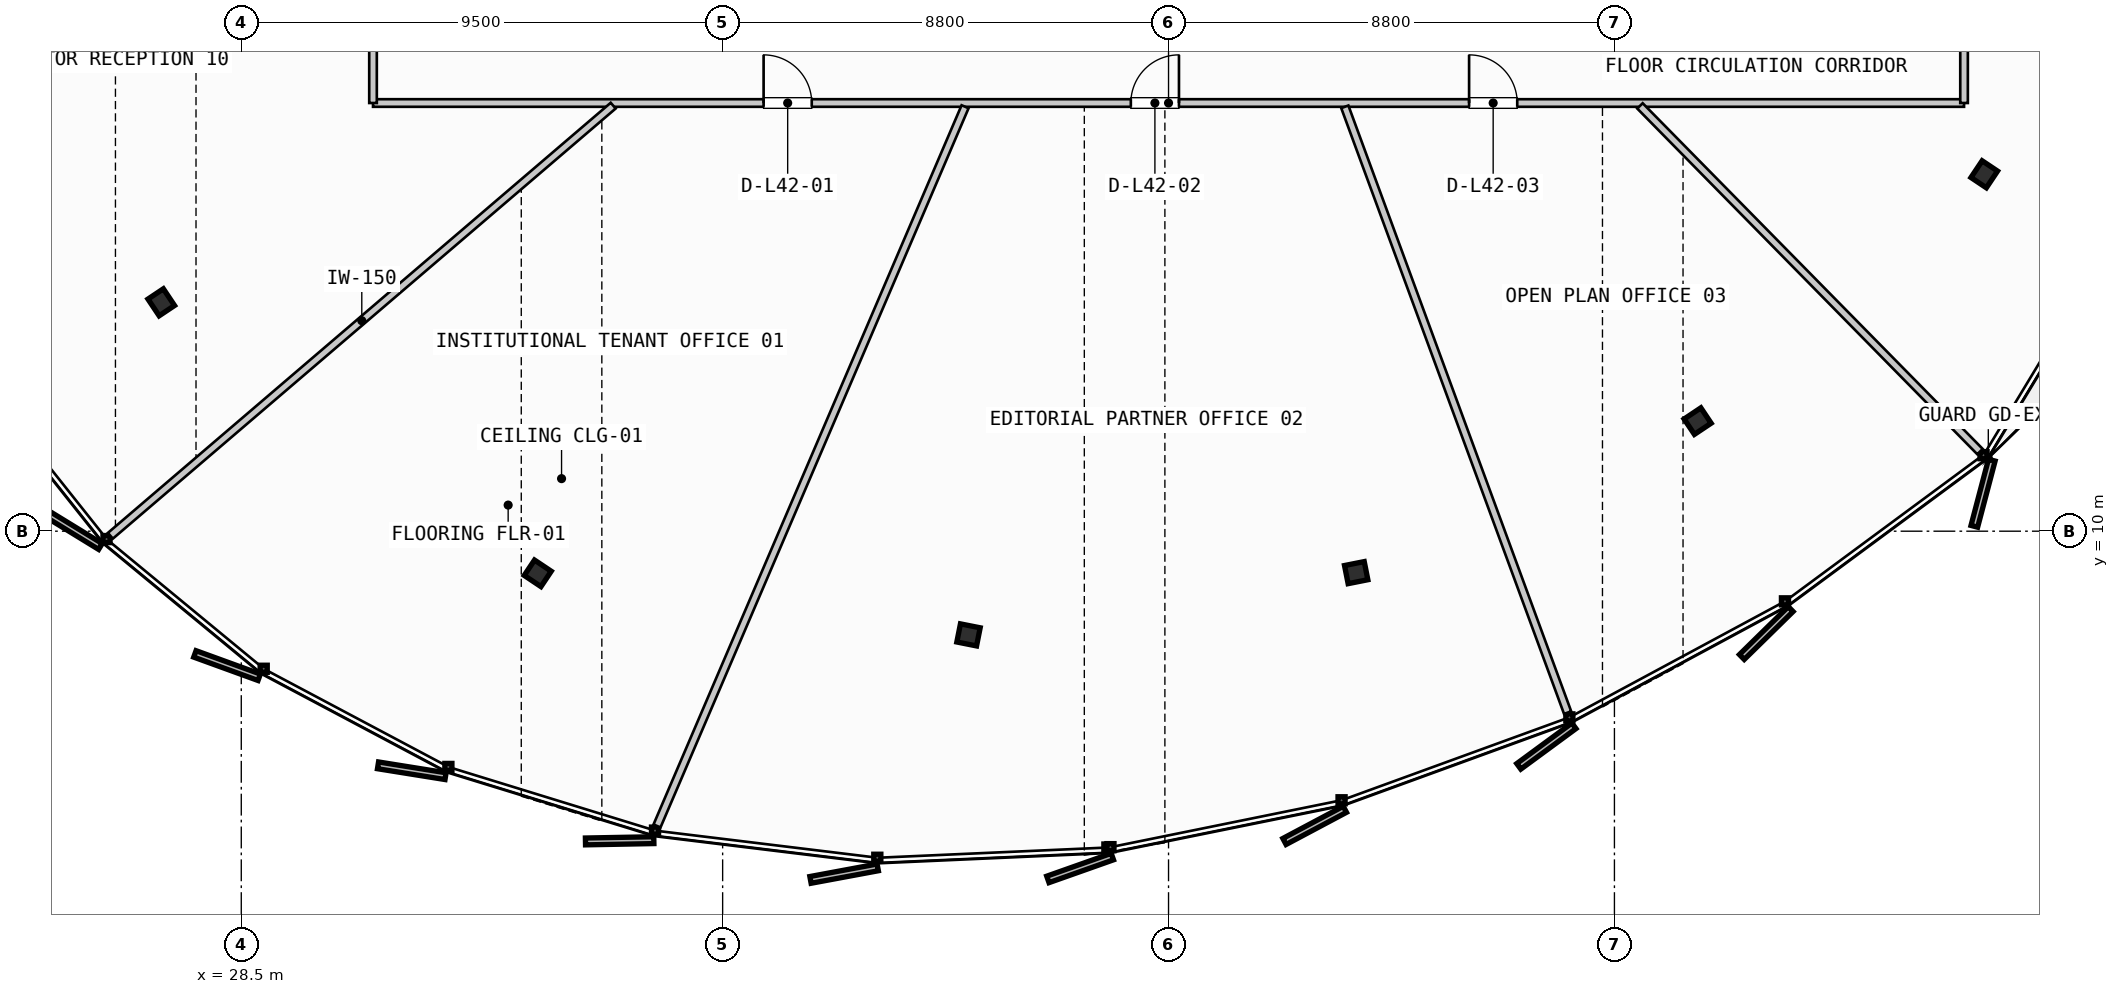
"""IFC4 building model, lengths in metres.
Left out: names, types, materials, properties, quantities, classifications, styles, units other than length and angle.
Written with IfcOpenShell. Run it as: python <this file> out.ifc"""

import sys

from ifc_helpers import new_model, si_unit, direction, frame, frame_2d, origin, origin_2d, place, context, subcontext, project, spatial, rectangle, i_section, extrude, source, transform, mapped, element, fill, save


model = new_model("IFC4")
c1 = context("Model", 3, precision=1e-05, world=origin(), true_north=direction((0.0, 1.0)))
c2 = subcontext(c1, "Body", "Model", "MODEL_VIEW")
j1 = project(units=[si_unit("LENGTHUNIT", "METRE"), si_unit("PLANEANGLEUNIT", "RADIAN")], contexts=[c1])
p1 = place(None, origin())
s1 = spatial("IfcSite", under=j1, at=p1, CompositionType="ELEMENT")
p2 = place(p1, origin())
s2 = spatial("IfcBuilding", under=s1, at=p2, CompositionType="ELEMENT")
p3 = place(p2, frame((0.0, 0.0, 164.3)))
s3 = spatial("IfcBuildingStorey", under=s2, at=p3, CompositionType="ELEMENT", Elevation=164.3)
m1 = source(origin(), c2, "Body", "SweptSolid", [
    extrude(i_section(OverallWidth=0.397, OverallDepth=0.365, WebThickness=0.028, FlangeThickness=0.044, FilletRadius=0.015, at=origin_2d()), origin(), (0.0, 0.0, 1.0), 3.3),
])
for number, where, z_axis, x_axis in (
    (1, (26.921, 14.517, 0.0), (0.0, 0.0, 1.0), (-0.831, -0.556, 0.0)),
    (2, (34.351, 9.168, 0.0), (0.0, 0.0, 1.0), (-0.556, -0.831, 0.0)),
    (3, (42.852, 7.954, 0.0), (0.0, 0.0, 1.0), (-0.195, -0.981, 0.0)),
    (4, (50.503, 9.182, 0.0), (0.0, 0.0, 1.0), (0.195, -0.981, 0.0)),
    (5, (57.242, 12.172, 0.0), (0.0, 0.0, 1.0), (0.556, -0.831, 0.0)),
    (6, (62.899, 17.043, 0.0), (0.0, 0.0, 1.0), (0.831, -0.556, 0.0)),
):
    element("IfcColumn", number, at=place(p3, frame(where, z_axis=z_axis, x_axis=x_axis)), inside=s3, PredefinedType="COLUMN", context=c2, shape_type="MappedRepresentation", body=[
        mapped(m1, transform((0.0, 0.0, 0.0), scale=1.0)),
    ])
p4 = place(p3, frame((31.1, 18.45, 0.0), z_axis=(0.0, 0.0, 1.0), x_axis=(1.0, 0.0, 0.0)))
e7 = element("IfcWall", 7, at=p4, inside=s3, PredefinedType="PARTITIONING", context=c2, shape_type="SweptSolid", body=[
    extrude(rectangle(XDim=31.4, YDim=0.15, at=frame_2d((15.7, 0.0))), origin(), (0.0, 0.0, 1.0), 2.28),
])
p5 = place(p4, frame((7.708, 0.0, 0.0)))
e8 = element("IfcOpeningElement", 8, at=p5, cuts=e7, PredefinedType="OPENING", context=c2, shape_type="SweptSolid", body=[
    extrude(rectangle(XDim=0.95, YDim=2.15, at=frame_2d((0.475, 1.075))), frame((0.0, 0.085, 0.0), z_axis=(0.0, -1.0, 0.0), x_axis=(1.0, 0.0, 0.0)), (0.0, 0.0, 1.0), 0.17),
])
p6 = place(p4, frame((14.956, 0.0, 0.0)))
e9 = element("IfcOpeningElement", 9, at=p6, cuts=e7, PredefinedType="OPENING", context=c2, shape_type="SweptSolid", body=[
    extrude(rectangle(XDim=0.95, YDim=2.15, at=frame_2d((0.475, 1.075))), frame((0.0, 0.085, 0.0), z_axis=(0.0, -1.0, 0.0), x_axis=(1.0, 0.0, 0.0)), (0.0, 0.0, 1.0), 0.17),
])
p7 = place(p4, frame((21.632, 0.0, 0.0)))
e10 = element("IfcOpeningElement", 10, at=p7, cuts=e7, PredefinedType="OPENING", context=c2, shape_type="SweptSolid", body=[
    extrude(rectangle(XDim=0.95, YDim=2.15, at=frame_2d((0.475, 1.075))), frame((0.0, 0.085, 0.0), z_axis=(0.0, -1.0, 0.0), x_axis=(1.0, 0.0, 0.0)), (0.0, 0.0, 1.0), 0.17),
])
for number, where, z_axis, x_axis in (
    (11, (62.5, 18.45, 0.0), (0.0, 0.0, 1.0), (0.0, 1.0, 0.0)),
    (12, (31.1, 20.15, 0.0), (0.0, 0.0, 1.0), (0.0, -1.0, 0.0)),
):
    element("IfcWall", number, at=place(p3, frame(where, z_axis=z_axis, x_axis=x_axis)), inside=s3, PredefinedType="PARTITIONING", context=c2, shape_type="SweptSolid", body=[
        extrude(rectangle(XDim=1.7, YDim=0.15, at=frame_2d((0.85, 0.0))), origin(), (0.0, 0.0, 1.0), 2.28),
    ])
p8 = place(p3, frame((35.84, 18.398, 0.0), z_axis=(0.0, 0.0, 1.0), x_axis=(-0.759925304689, -0.650010408604, 0.0)))
e13 = element("IfcWall", 13, at=p8, inside=s3, PredefinedType="PARTITIONING", context=c2, shape_type="SweptSolid", body=[
    extrude(rectangle(XDim=13.058, YDim=0.15, at=frame_2d((6.529, 0.0))), origin(), (0.0, 0.0, 1.0), 2.28),
])
p9 = place(p3, frame((42.785, 18.376, 0.0), z_axis=(0.0, 0.0, 1.0), x_axis=(-0.393766631536, -0.919210443744, 0.0)))
e14 = element("IfcWall", 14, at=p9, inside=s3, PredefinedType="PARTITIONING", context=c2, shape_type="SweptSolid", body=[
    extrude(rectangle(XDim=15.441, YDim=0.15, at=frame_2d((7.72, 0.0))), origin(), (0.0, 0.0, 1.0), 2.28),
])
p10 = place(p3, frame((50.279, 18.375, 0.0), z_axis=(0.0, 0.0, 1.0), x_axis=(0.345178614935, -0.938537012478, 0.0)))
e15 = element("IfcWall", 15, at=p10, inside=s3, PredefinedType="PARTITIONING", context=c2, shape_type="SweptSolid", body=[
    extrude(rectangle(XDim=12.738, YDim=0.15, at=frame_2d((6.369, 0.0))), origin(), (0.0, 0.0, 1.0), 2.28),
])
p11 = place(p3, frame((56.104, 18.393, 0.0), z_axis=(0.0, 0.0, 1.0), x_axis=(0.701253006268, -0.712912491965, 0.0)))
e16 = element("IfcWall", 16, at=p11, inside=s3, PredefinedType="PARTITIONING", context=c2, shape_type="SweptSolid", body=[
    extrude(rectangle(XDim=9.569, YDim=0.15, at=frame_2d((4.785, 0.0))), origin(), (0.0, 0.0, 1.0), 2.28),
])
m2 = source(origin(), c2, "Body", "SweptSolid", [
    extrude(rectangle(XDim=0.95, YDim=2.15, at=frame_2d((0.475, 1.075))), frame((0.0, 0.025, 0.0), z_axis=(0.0, -1.0, 0.0), x_axis=(1.0, 0.0, 0.0)), (0.0, 0.0, 1.0), 0.05),
])
p12 = place(p5, origin())
e17 = element("IfcDoor", 17, at=p12, inside=s3, OperationType="SINGLE_SWING_LEFT", PredefinedType="DOOR", context=c2, shape_type="MappedRepresentation", body=[
    mapped(m2, transform((0.0, 0.0, 0.0), scale=1.0)),
])
fill(e8, e17)
p13 = place(p6, origin())
e18 = element("IfcDoor", 18, at=p13, inside=s3, OperationType="SINGLE_SWING_RIGHT", PredefinedType="DOOR", context=c2, shape_type="MappedRepresentation", body=[
    mapped(m2, transform((0.0, 0.0, 0.0), scale=1.0)),
])
fill(e9, e18)
p14 = place(p7, origin())
e19 = element("IfcDoor", 19, at=p14, inside=s3, OperationType="SINGLE_SWING_LEFT", PredefinedType="DOOR", context=c2, shape_type="MappedRepresentation", body=[
    mapped(m2, transform((0.0, 0.0, 0.0), scale=1.0)),
])
fill(e10, e19)
save(model, sys.argv[1])
